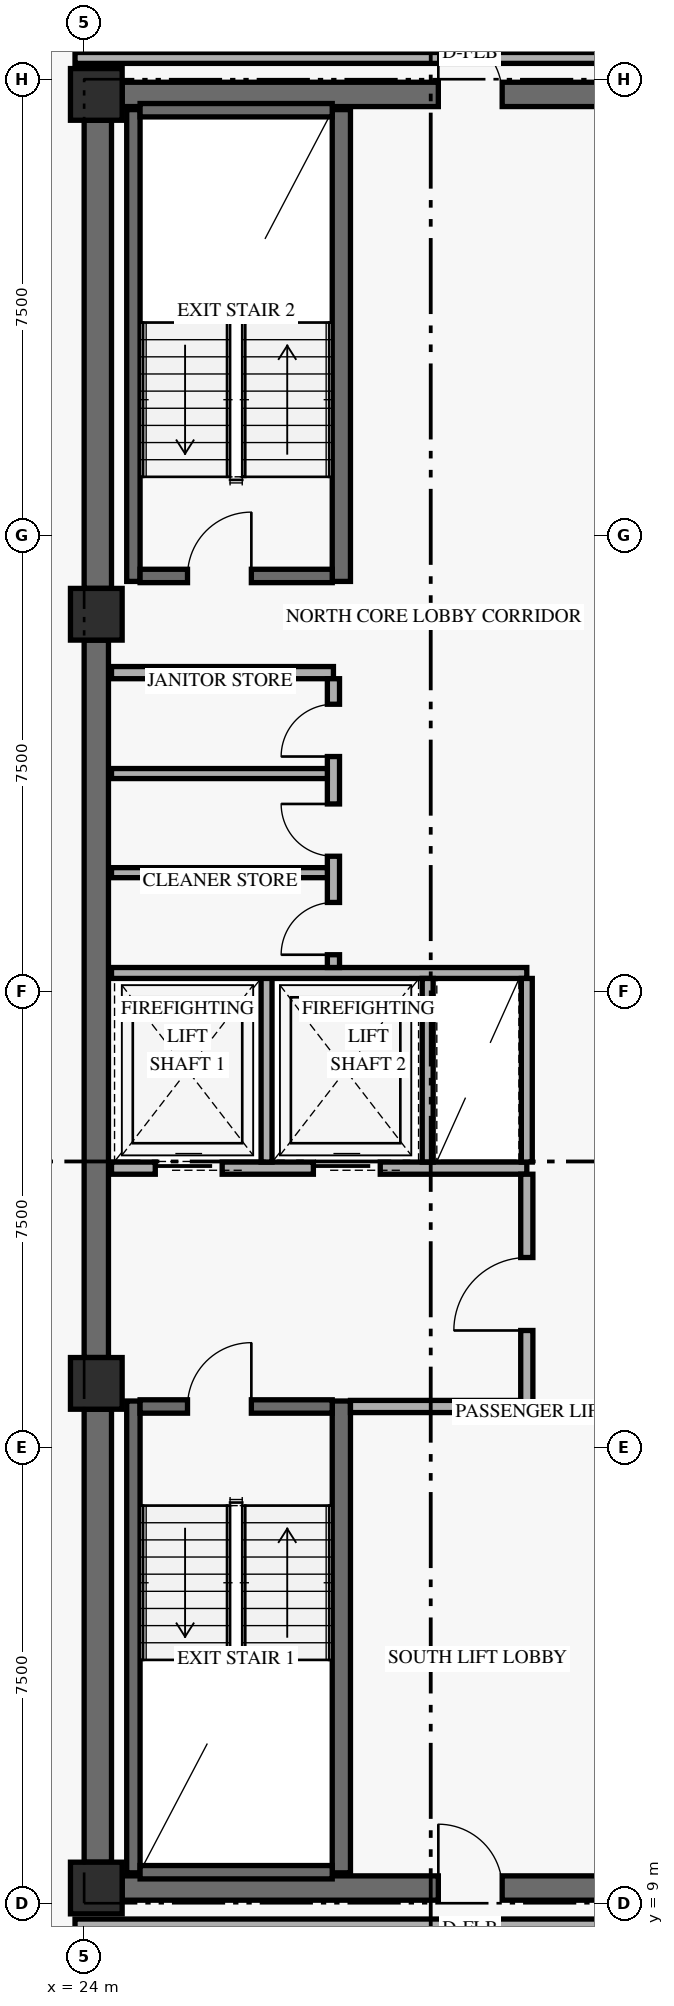
"""IFC4 building model, lengths in metres.
Left out: names, types, materials, properties, quantities, classifications, styles, units other than length and angle.
Written with IfcOpenShell. Run it as: python <this file> out.ifc"""

import sys

from ifc_helpers import new_model, si_unit, direction, frame, frame_2d, origin, origin_2d, place, context, subcontext, project, spatial, rectangle, extrude, element, fill, save


model = new_model("IFC4")
c1 = context("Model", 3, precision=1e-05, world=origin(), true_north=direction((0.0, 1.0)))
c2 = subcontext(c1, "Body", "Model", "MODEL_VIEW")
j1 = project(units=[si_unit("LENGTHUNIT", "METRE"), si_unit("PLANEANGLEUNIT", "RADIAN")], contexts=[c1])
p1 = place(None, origin())
s1 = spatial("IfcSite", under=j1, at=p1, CompositionType="ELEMENT")
p2 = place(p1, origin())
s2 = spatial("IfcBuilding", under=s1, at=p2, CompositionType="ELEMENT")
p3 = place(p2, frame((0.0, 0.0, 124.8)))
s3 = spatial("IfcBuildingStorey", under=s2, at=p3, CompositionType="ELEMENT", Elevation=124.8)
p4 = place(p3, frame((24.225, 9.675, 0.0), z_axis=(0.0, 0.0, 1.0), x_axis=(0.0, 1.0, 0.0)))
e1 = element("IfcWall", 1, at=p4, inside=s3, PredefinedType="SHEAR", context=c2, shape_type="SweptSolid", body=[
    extrude(rectangle(XDim=7.45, YDim=0.45, at=frame_2d((3.725, 0.0))), origin(), (0.0, 0.0, 1.0), 2.749),
])
p5 = place(p3, frame((24.2, 17.975, 0.0), z_axis=(0.0, 0.0, 1.0), x_axis=(0.0, 1.0, 0.0)))
e2 = element("IfcWall", 2, at=p5, inside=s3, PredefinedType="SHEAR", context=c2, shape_type="SweptSolid", body=[
    extrude(rectangle(XDim=11.8, YDim=0.4, at=frame_2d((5.9, 0.0))), origin(), (0.0, 0.0, 1.0), 2.749),
])
p6 = place(p3, frame((24.225, 30.625, 0.0), z_axis=(0.0, 0.0, 1.0), x_axis=(0.0, 1.0, 0.0)))
e3 = element("IfcWall", 3, at=p6, inside=s3, PredefinedType="SHEAR", context=c2, shape_type="SweptSolid", body=[
    extrude(rectangle(XDim=7.7, YDim=0.45, at=frame_2d((3.85, 0.0))), origin(), (0.0, 0.0, 1.0), 2.749),
])
p7 = place(p3, frame((24.625, 9.25, 0.0), z_axis=(0.0, 0.0, 1.0), x_axis=(1.0, 0.0, 0.0)))
e4 = element("IfcWall", 4, at=p7, inside=s3, PredefinedType="SHEAR", context=c2, shape_type="SweptSolid", body=[
    extrude(rectangle(XDim=10.15, YDim=0.4, at=frame_2d((5.075, 0.0))), origin(), (0.0, 0.0, 1.0), 3.36),
])
p8 = place(p7, frame((5.2, 0.0, 0.0)))
e5 = element("IfcOpeningElement", 5, at=p8, cuts=e4, PredefinedType="OPENING", context=c2, shape_type="SweptSolid", body=[
    extrude(rectangle(XDim=1.05, YDim=2.15, at=frame_2d((0.525, 1.075))), frame((0.0, 0.21, 0.0), z_axis=(0.0, -1.0, 0.0), x_axis=(1.0, 0.0, 0.0)), (0.0, 0.0, 1.0), 0.42),
])
p9 = place(p3, frame((24.625, 38.75, 0.0), z_axis=(0.0, 0.0, 1.0), x_axis=(1.0, 0.0, 0.0)))
e6 = element("IfcWall", 6, at=p9, inside=s3, PredefinedType="SHEAR", context=c2, shape_type="SweptSolid", body=[
    extrude(rectangle(XDim=10.15, YDim=0.4, at=frame_2d((5.075, 0.0))), origin(), (0.0, 0.0, 1.0), 3.36),
])
p10 = place(p9, frame((5.2, 0.0, 0.0)))
e7 = element("IfcOpeningElement", 7, at=p10, cuts=e6, PredefinedType="OPENING", context=c2, shape_type="SweptSolid", body=[
    extrude(rectangle(XDim=1.05, YDim=2.15, at=frame_2d((0.525, 1.075))), frame((0.0, 0.21, 0.0), z_axis=(0.0, -1.0, 0.0), x_axis=(1.0, 0.0, 0.0)), (0.0, 0.0, 1.0), 0.42),
])
p11 = place(p3, frame((24.81, 9.5, 0.0), z_axis=(0.0, 0.0, 1.0), x_axis=(0.0, 1.0, 0.0)))
e8 = element("IfcWall", 8, at=p11, inside=s3, PredefinedType="SHEAR", context=c2, shape_type="SweptSolid", body=[
    extrude(rectangle(XDim=7.76, YDim=0.22, at=frame_2d((3.88, 0.0))), origin(), (0.0, 0.0, 1.0), 3.36),
])
p12 = place(p3, frame((28.23, 9.5, 0.0), z_axis=(0.0, 0.0, 1.0), x_axis=(0.0, 1.0, 0.0)))
e9 = element("IfcWall", 9, at=p12, inside=s3, PredefinedType="SHEAR", context=c2, shape_type="SweptSolid", body=[
    extrude(rectangle(XDim=7.76, YDim=0.3, at=frame_2d((3.88, 0.0))), origin(), (0.0, 0.0, 1.0), 3.36),
])
p13 = place(p3, frame((24.92, 9.51, 0.0), z_axis=(0.0, 0.0, 1.0), x_axis=(1.0, 0.0, 0.0)))
e10 = element("IfcWall", 10, at=p13, inside=s3, PredefinedType="SHEAR", context=c2, shape_type="SweptSolid", body=[
    extrude(rectangle(XDim=3.16, YDim=0.22, at=frame_2d((1.58, 0.0))), origin(), (0.0, 0.0, 1.0), 3.36),
])
p14 = place(p3, frame((24.92, 17.17, 0.0), z_axis=(0.0, 0.0, 1.0), x_axis=(1.0, 0.0, 0.0)))
e11 = element("IfcWall", 11, at=p14, inside=s3, PredefinedType="SHEAR", context=c2, shape_type="SweptSolid", body=[
    extrude(rectangle(XDim=3.16, YDim=0.22, at=frame_2d((1.58, 0.0))), origin(), (0.0, 0.0, 1.0), 3.36),
])
p15 = place(p14, frame((0.78, 0.0, 0.0)))
e12 = element("IfcOpeningElement", 12, at=p15, cuts=e11, PredefinedType="OPENING", context=c2, shape_type="SweptSolid", body=[
    extrude(rectangle(XDim=1.05, YDim=2.15, at=frame_2d((0.525, 1.075))), frame((0.0, 0.12, 0.0), z_axis=(0.0, -1.0, 0.0), x_axis=(1.0, 0.0, 0.0)), (0.0, 0.0, 1.0), 0.24),
])
p16 = place(p3, frame((24.81, 30.74, 0.0), z_axis=(0.0, 0.0, 1.0), x_axis=(0.0, 1.0, 0.0)))
e13 = element("IfcWall", 13, at=p16, inside=s3, PredefinedType="SHEAR", context=c2, shape_type="SweptSolid", body=[
    extrude(rectangle(XDim=7.76, YDim=0.22, at=frame_2d((3.88, 0.0))), origin(), (0.0, 0.0, 1.0), 3.36),
])
p17 = place(p3, frame((28.23, 30.74, 0.0), z_axis=(0.0, 0.0, 1.0), x_axis=(0.0, 1.0, 0.0)))
e14 = element("IfcWall", 14, at=p17, inside=s3, PredefinedType="SHEAR", context=c2, shape_type="SweptSolid", body=[
    extrude(rectangle(XDim=7.76, YDim=0.3, at=frame_2d((3.88, 0.0))), origin(), (0.0, 0.0, 1.0), 3.36),
])
p18 = place(p3, frame((24.92, 30.83, 0.0), z_axis=(0.0, 0.0, 1.0), x_axis=(1.0, 0.0, 0.0)))
e15 = element("IfcWall", 15, at=p18, inside=s3, PredefinedType="SHEAR", context=c2, shape_type="SweptSolid", body=[
    extrude(rectangle(XDim=3.16, YDim=0.22, at=frame_2d((1.58, 0.0))), origin(), (0.0, 0.0, 1.0), 3.36),
])
p19 = place(p18, frame((0.78, 0.0, 0.0)))
e16 = element("IfcOpeningElement", 16, at=p19, cuts=e15, PredefinedType="OPENING", context=c2, shape_type="SweptSolid", body=[
    extrude(rectangle(XDim=1.05, YDim=2.15, at=frame_2d((0.525, 1.075))), frame((0.0, 0.12, 0.0), z_axis=(0.0, -1.0, 0.0), x_axis=(1.0, 0.0, 0.0)), (0.0, 0.0, 1.0), 0.24),
])
p20 = place(p3, frame((24.92, 38.49, 0.0), z_axis=(0.0, 0.0, 1.0), x_axis=(1.0, 0.0, 0.0)))
e17 = element("IfcWall", 17, at=p20, inside=s3, PredefinedType="SHEAR", context=c2, shape_type="SweptSolid", body=[
    extrude(rectangle(XDim=3.16, YDim=0.22, at=frame_2d((1.58, 0.0))), origin(), (0.0, 0.0, 1.0), 3.36),
])
for number, where, z_axis, x_axis in (
    (18, (24.2, 9.25, 0.0), (0.0, 0.0, 1.0), (1.0, 0.0, 0.0)),
    (19, (24.2, 17.55, 0.0), (0.0, 0.0, 1.0), (1.0, 0.0, 0.0)),
    (20, (24.2, 30.2, 0.0), (0.0, 0.0, 1.0), (1.0, 0.0, 0.0)),
    (21, (24.2, 38.75, 0.0), (0.0, 0.0, 1.0), (1.0, 0.0, 0.0)),
):
    element("IfcColumn", number, at=place(p3, frame(where, z_axis=z_axis, x_axis=x_axis)), inside=s3, PredefinedType="COLUMN", context=c2, shape_type="SweptSolid", body=[
        extrude(rectangle(XDim=0.85, YDim=0.85, at=origin_2d()), origin(), (0.0, 0.0, 1.0), 3.6),
    ])
p21 = place(p3, frame((24.45, 21.09, 0.0), z_axis=(0.0, 0.0, 1.0), x_axis=(1.0, 0.0, 0.0)))
e22 = element("IfcWall", 22, at=p21, inside=s3, PredefinedType="STANDARD", context=c2, shape_type="SweptSolid", body=[
    extrude(rectangle(XDim=6.83, YDim=0.2, at=frame_2d((3.415, 0.0))), origin(), (0.0, 0.0, 1.0), 3.36),
])
p22 = place(p21, frame((0.72, 0.0, 0.0)))
e23 = element("IfcOpeningElement", 23, at=p22, cuts=e22, PredefinedType="OPENING", context=c2, shape_type="SweptSolid", body=[
    extrude(rectangle(XDim=1.1, YDim=2.2, at=frame_2d((0.55, 1.1))), frame((0.0, 0.11, 0.0), z_axis=(0.0, -1.0, 0.0), x_axis=(1.0, 0.0, 0.0)), (0.0, 0.0, 1.0), 0.22),
])
p23 = place(p21, frame((3.32, 0.0, 0.0)))
e24 = element("IfcOpeningElement", 24, at=p23, cuts=e22, PredefinedType="OPENING", context=c2, shape_type="SweptSolid", body=[
    extrude(rectangle(XDim=1.1, YDim=2.2, at=frame_2d((0.55, 1.1))), frame((0.0, 0.11, 0.0), z_axis=(0.0, -1.0, 0.0), x_axis=(1.0, 0.0, 0.0)), (0.0, 0.0, 1.0), 0.22),
])
p24 = place(p3, frame((28.38, 17.17, 0.0), z_axis=(0.0, 0.0, 1.0), x_axis=(1.0, 0.0, 0.0)))
e25 = element("IfcWall", 25, at=p24, inside=s3, PredefinedType="STANDARD", context=c2, shape_type="SweptSolid", body=[
    extrude(rectangle(XDim=2.9, YDim=0.2, at=frame_2d((1.45, 0.0))), origin(), (0.0, 0.0, 1.0), 3.36),
])
p25 = place(p3, frame((31.28, 17.07, 0.0), z_axis=(0.0, 0.0, 1.0), x_axis=(0.0, 1.0, 0.0)))
e26 = element("IfcWall", 26, at=p25, inside=s3, PredefinedType="STANDARD", context=c2, shape_type="SweptSolid", body=[
    extrude(rectangle(XDim=3.92, YDim=0.2, at=frame_2d((1.96, 0.0))), origin(), (0.0, 0.0, 1.0), 2.731),
])
p26 = place(p25, frame((1.35, 0.0, 0.0)))
e27 = element("IfcOpeningElement", 27, at=p26, cuts=e26, PredefinedType="OPENING", context=c2, shape_type="SweptSolid", body=[
    extrude(rectangle(XDim=1.2, YDim=2.15, at=frame_2d((0.6, 1.075))), frame((0.0, 0.11, 0.0), z_axis=(0.0, -1.0, 0.0), x_axis=(1.0, 0.0, 0.0)), (0.0, 0.0, 1.0), 0.22),
])
p27 = place(p3, frame((27.0, 21.19, 0.0), z_axis=(0.0, 0.0, 1.0), x_axis=(0.0, 1.0, 0.0)))
e28 = element("IfcWall", 28, at=p27, inside=s3, PredefinedType="STANDARD", context=c2, shape_type="SweptSolid", body=[
    extrude(rectangle(XDim=3.11, YDim=0.18, at=frame_2d((1.555, 0.0))), origin(), (0.0, 0.0, 1.0), 3.36),
])
p28 = place(p3, frame((24.45, 24.3, 0.0), z_axis=(0.0, 0.0, 1.0), x_axis=(1.0, 0.0, 0.0)))
e29 = element("IfcWall", 29, at=p28, inside=s3, PredefinedType="STANDARD", context=c2, shape_type="SweptSolid", body=[
    extrude(rectangle(XDim=6.83, YDim=0.18, at=frame_2d((3.415, 0.0))), origin(), (0.0, 0.0, 1.0), 3.36),
])
for number, where, z_axis, x_axis in (
    (30, (29.65, 21.19, 0.0), (0.0, 0.0, 1.0), (0.0, 1.0, 0.0)),
    (31, (31.28, 21.19, 0.0), (0.0, 0.0, 1.0), (0.0, 1.0, 0.0)),
):
    element("IfcWall", number, at=place(p3, frame(where, z_axis=z_axis, x_axis=x_axis)), inside=s3, PredefinedType="STANDARD", context=c2, shape_type="SweptSolid", body=[
        extrude(rectangle(XDim=3.02, YDim=0.18, at=frame_2d((1.51, 0.0))), origin(), (0.0, 0.0, 1.0), 3.36),
    ])
p29 = place(p3, frame((24.45, 29.24, 0.0), z_axis=(0.0, 0.0, 1.0), x_axis=(1.0, 0.0, 0.0)))
e32 = element("IfcWall", 32, at=p29, inside=s3, PredefinedType="STANDARD", context=c2, shape_type="SweptSolid", body=[
    extrude(rectangle(XDim=3.65, YDim=0.2, at=frame_2d((1.825, 0.0))), origin(), (0.0, 0.0, 1.0), 3.36),
])
p30 = place(p3, frame((28.1, 24.39, 0.0), z_axis=(0.0, 0.0, 1.0), x_axis=(0.0, 1.0, 0.0)))
e33 = element("IfcWall", 33, at=p30, inside=s3, PredefinedType="STANDARD", context=c2, shape_type="SweptSolid", body=[
    extrude(rectangle(XDim=4.75, YDim=0.2, at=frame_2d((2.375, 0.0))), origin(), (0.0, 0.0, 1.0), 3.36),
])
p31 = place(p30, frame((0.21, 0.0, 0.0)))
e34 = element("IfcOpeningElement", 34, at=p31, cuts=e33, PredefinedType="OPENING", context=c2, shape_type="SweptSolid", body=[
    extrude(rectangle(XDim=0.86, YDim=2.1, at=frame_2d((0.43, 1.05))), frame((0.0, 0.11, 0.0), z_axis=(0.0, -1.0, 0.0), x_axis=(1.0, 0.0, 0.0)), (0.0, 0.0, 1.0), 0.22),
])
p32 = place(p30, frame((1.83, 0.0, 0.0)))
e35 = element("IfcOpeningElement", 35, at=p32, cuts=e33, PredefinedType="OPENING", context=c2, shape_type="SweptSolid", body=[
    extrude(rectangle(XDim=0.86, YDim=2.1, at=frame_2d((0.43, 1.05))), frame((0.0, 0.11, 0.0), z_axis=(0.0, -1.0, 0.0), x_axis=(1.0, 0.0, 0.0)), (0.0, 0.0, 1.0), 0.22),
])
p33 = place(p30, frame((3.47, 0.0, 0.0)))
e36 = element("IfcOpeningElement", 36, at=p33, cuts=e33, PredefinedType="OPENING", context=c2, shape_type="SweptSolid", body=[
    extrude(rectangle(XDim=0.86, YDim=2.1, at=frame_2d((0.43, 1.05))), frame((0.0, 0.11, 0.0), z_axis=(0.0, -1.0, 0.0), x_axis=(1.0, 0.0, 0.0)), (0.0, 0.0, 1.0), 0.22),
])
for number, where, z_axis, x_axis in (
    (37, (24.45, 25.95, 0.0), (0.0, 0.0, 1.0), (1.0, 0.0, 0.0)),
    (38, (24.45, 27.58, 0.0), (0.0, 0.0, 1.0), (1.0, 0.0, 0.0)),
):
    element("IfcWall", number, at=place(p3, frame(where, z_axis=z_axis, x_axis=x_axis)), inside=s3, PredefinedType="PARTITIONING", context=c2, shape_type="SweptSolid", body=[
        extrude(rectangle(XDim=3.55, YDim=0.165, at=frame_2d((1.775, 0.0))), origin(), (0.0, 0.0, 1.0), 3.36),
    ])
for number, where, z_axis, x_axis in (
    (39, (23.85, 8.65, 0.0), (0.0, 0.0, 1.0), (1.0, 0.0, 0.0)),
    (40, (23.85, 39.35, 0.0), (0.0, 0.0, 1.0), (1.0, 0.0, 0.0)),
):
    element("IfcWall", number, at=place(p3, frame(where, z_axis=z_axis, x_axis=x_axis)), inside=s3, PredefinedType="STANDARD", context=c2, shape_type="SweptSolid", body=[
        extrude(rectangle(XDim=11.57, YDim=0.18, at=frame_2d((5.785, 0.0))), origin(), (0.0, 0.0, 1.0), 2.731),
    ])
p34 = place(p15, frame((1.05, 0.0, 0.0), z_axis=(0.0, 0.0, 1.0), x_axis=(-1.0, 0.0, 0.0)))
e41 = element("IfcDoor", 41, at=p34, inside=s3, OperationType="SINGLE_SWING_LEFT", PredefinedType="DOOR", context=c2, shape_type="SweptSolid", body=[
    extrude(rectangle(XDim=1.05, YDim=2.15, at=frame_2d((0.525, 1.075))), frame((0.0, 0.025, 0.0), z_axis=(0.0, -1.0, 0.0), x_axis=(1.0, 0.0, 0.0)), (0.0, 0.0, 1.0), 0.05),
])
fill(e12, e41)
p35 = place(p19, origin())
e42 = element("IfcDoor", 42, at=p35, inside=s3, OperationType="SINGLE_SWING_RIGHT", PredefinedType="DOOR", context=c2, shape_type="SweptSolid", body=[
    extrude(rectangle(XDim=1.05, YDim=2.15, at=frame_2d((0.525, 1.075))), frame((0.0, 0.025, 0.0), z_axis=(0.0, -1.0, 0.0), x_axis=(1.0, 0.0, 0.0)), (0.0, 0.0, 1.0), 0.05),
])
fill(e16, e42)
p36 = place(p22, origin())
e43 = element("IfcDoor", 43, at=p36, inside=s3, OperationType="SLIDING_TO_LEFT", PredefinedType="DOOR", context=c2, shape_type="SweptSolid", body=[
    extrude(rectangle(XDim=1.1, YDim=2.2, at=frame_2d((0.55, 1.1))), frame((0.0, 0.025, 0.0), z_axis=(0.0, -1.0, 0.0), x_axis=(1.0, 0.0, 0.0)), (0.0, 0.0, 1.0), 0.05),
])
fill(e23, e43)
p37 = place(p23, origin())
e44 = element("IfcDoor", 44, at=p37, inside=s3, OperationType="SLIDING_TO_LEFT", PredefinedType="DOOR", context=c2, shape_type="SweptSolid", body=[
    extrude(rectangle(XDim=1.1, YDim=2.2, at=frame_2d((0.55, 1.1))), frame((0.0, 0.025, 0.0), z_axis=(0.0, -1.0, 0.0), x_axis=(1.0, 0.0, 0.0)), (0.0, 0.0, 1.0), 0.05),
])
fill(e24, e44)
p38 = place(p26, origin())
e45 = element("IfcDoor", 45, at=p38, inside=s3, OperationType="SINGLE_SWING_LEFT", PredefinedType="DOOR", context=c2, shape_type="SweptSolid", body=[
    extrude(rectangle(XDim=1.2, YDim=2.15, at=frame_2d((0.6, 1.075))), frame((0.0, 0.025, 0.0), z_axis=(0.0, -1.0, 0.0), x_axis=(1.0, 0.0, 0.0)), (0.0, 0.0, 1.0), 0.05),
])
fill(e27, e45)
p39 = place(p31, origin())
e46 = element("IfcDoor", 46, at=p39, inside=s3, OperationType="SINGLE_SWING_LEFT", PredefinedType="DOOR", context=c2, shape_type="SweptSolid", body=[
    extrude(rectangle(XDim=0.86, YDim=2.1, at=frame_2d((0.43, 1.05))), frame((0.0, 0.025, 0.0), z_axis=(0.0, -1.0, 0.0), x_axis=(1.0, 0.0, 0.0)), (0.0, 0.0, 1.0), 0.05),
])
fill(e34, e46)
p40 = place(p32, origin())
e47 = element("IfcDoor", 47, at=p40, inside=s3, OperationType="SINGLE_SWING_RIGHT", PredefinedType="DOOR", context=c2, shape_type="SweptSolid", body=[
    extrude(rectangle(XDim=0.86, YDim=2.1, at=frame_2d((0.43, 1.05))), frame((0.0, 0.025, 0.0), z_axis=(0.0, -1.0, 0.0), x_axis=(1.0, 0.0, 0.0)), (0.0, 0.0, 1.0), 0.05),
])
fill(e35, e47)
p41 = place(p33, origin())
e48 = element("IfcDoor", 48, at=p41, inside=s3, OperationType="SINGLE_SWING_LEFT", PredefinedType="DOOR", context=c2, shape_type="SweptSolid", body=[
    extrude(rectangle(XDim=0.86, YDim=2.1, at=frame_2d((0.43, 1.05))), frame((0.0, 0.025, 0.0), z_axis=(0.0, -1.0, 0.0), x_axis=(1.0, 0.0, 0.0)), (0.0, 0.0, 1.0), 0.05),
])
fill(e36, e48)
p42 = place(p8, origin())
e49 = element("IfcDoor", 49, at=p42, inside=s3, OperationType="SINGLE_SWING_LEFT", PredefinedType="DOOR", context=c2, shape_type="SweptSolid", body=[
    extrude(rectangle(XDim=1.05, YDim=2.15, at=frame_2d((0.525, 1.075))), frame((0.0, 0.025, 0.0), z_axis=(0.0, -1.0, 0.0), x_axis=(1.0, 0.0, 0.0)), (0.0, 0.0, 1.0), 0.05),
])
fill(e5, e49)
p43 = place(p10, frame((1.05, 0.0, 0.0), z_axis=(0.0, 0.0, 1.0), x_axis=(-1.0, 0.0, 0.0)))
e50 = element("IfcDoor", 50, at=p43, inside=s3, OperationType="SINGLE_SWING_RIGHT", PredefinedType="DOOR", context=c2, shape_type="SweptSolid", body=[
    extrude(rectangle(XDim=1.05, YDim=2.15, at=frame_2d((0.525, 1.075))), frame((0.0, 0.025, 0.0), z_axis=(0.0, -1.0, 0.0), x_axis=(1.0, 0.0, 0.0)), (0.0, 0.0, 1.0), 0.05),
])
fill(e7, e50)
save(model, sys.argv[1])
